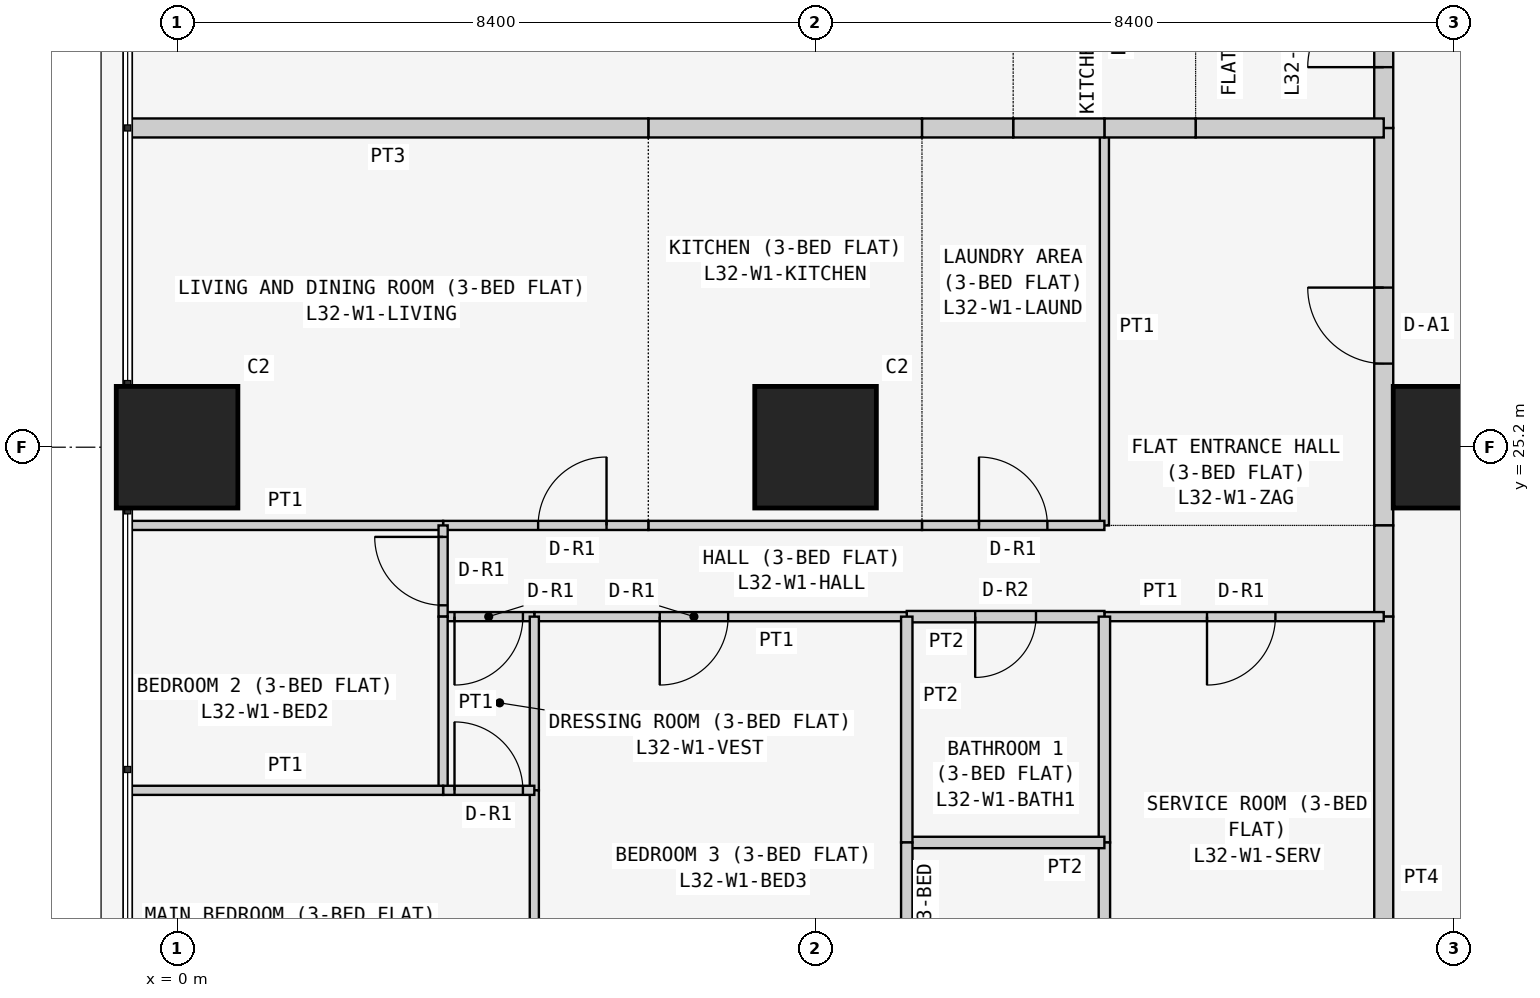
"""IFC4 building model, lengths in metres.
Left out: names, types, materials, properties, quantities, classifications, styles, units other than length and angle.
Written with IfcOpenShell. Run it as: python <this file> out.ifc"""

import sys

from ifc_helpers import new_model, si_unit, direction, frame, frame_2d, origin, origin_2d, place, context, subcontext, project, spatial, rectangle, extrude, element, fill, save


model = new_model("IFC4")
c1 = context("Model", 3, precision=1e-05, world=origin(), true_north=direction((0.0, 1.0)))
c2 = subcontext(c1, "Body", "Model", "MODEL_VIEW")
j1 = project(units=[si_unit("LENGTHUNIT", "METRE"), si_unit("PLANEANGLEUNIT", "RADIAN")], contexts=[c1])
p1 = place(None, origin())
s1 = spatial("IfcSite", under=j1, at=p1, CompositionType="ELEMENT")
p2 = place(p1, origin())
s2 = spatial("IfcBuilding", under=s1, at=p2, CompositionType="ELEMENT")
p3 = place(p2, frame((0.0, 0.0, 126.9)))
s3 = spatial("IfcBuildingStorey", under=s2, at=p3, CompositionType="ELEMENT", Elevation=126.9)
for number, where, z_axis, x_axis in (
    (1, (0.0, 25.2, 0.0), (0.0, 0.0, 1.0), (1.0, 0.0, 0.0)),
    (2, (8.4, 25.2, 0.0), (0.0, 0.0, 1.0), (1.0, 0.0, 0.0)),
    (3, (16.8, 25.2, 0.0), (0.0, 0.0, 1.0), (1.0, 0.0, 0.0)),
):
    element("IfcColumn", number, at=place(p3, frame(where, z_axis=z_axis, x_axis=x_axis)), inside=s3, PredefinedType="COLUMN", context=c2, shape_type="SweptSolid", body=[
        extrude(rectangle(XDim=1.6, YDim=1.6, at=origin_2d()), origin(), (0.0, 0.0, 1.0), 3.6),
    ])
p4 = place(p3, frame((15.875, 24.171, 0.0), z_axis=(0.0, 0.0, 1.0), x_axis=(0.0, 1.0, 0.0)))
e4 = element("IfcWall", 4, at=p4, inside=s3, PredefinedType="PARTITIONING", context=c2, shape_type="SweptSolid", body=[
    extrude(rectangle(XDim=5.229, YDim=0.25, at=frame_2d((2.615, 0.0))), origin(), (0.0, 0.0, 1.0), 3.45),
])
p5 = place(p4, frame((2.129, 0.0, 0.0)))
e5 = element("IfcOpeningElement", 5, at=p5, cuts=e4, PredefinedType="OPENING", context=c2, shape_type="SweptSolid", body=[
    extrude(rectangle(XDim=1.0, YDim=2.1, at=frame_2d((0.5, 1.05))), frame((0.0, 0.135, 0.0), z_axis=(0.0, -1.0, 0.0), x_axis=(1.0, 0.0, 0.0)), (0.0, 0.0, 1.0), 0.27),
])
p6 = place(p3, frame((15.875, 22.971, 0.0), z_axis=(0.0, 0.0, 1.0), x_axis=(0.0, 1.0, 0.0)))
e6 = element("IfcWall", 6, at=p6, inside=s3, PredefinedType="PARTITIONING", context=c2, shape_type="SweptSolid", body=[
    extrude(rectangle(XDim=1.2, YDim=0.25, at=frame_2d((0.6, 0.0))), origin(), (0.0, 0.0, 1.0), 3.45),
])
p7 = place(p3, frame((15.875, 16.1, 0.0), z_axis=(0.0, 0.0, 1.0), x_axis=(0.0, 1.0, 0.0)))
e7 = element("IfcWall", 7, at=p7, inside=s3, PredefinedType="PARTITIONING", context=c2, shape_type="SweptSolid", body=[
    extrude(rectangle(XDim=6.871, YDim=0.25, at=frame_2d((3.436, 0.0))), origin(), (0.0, 0.0, 1.0), 3.45),
])
p8 = place(p3, frame((15.875, 29.4, 0.0), z_axis=(0.0, 0.0, 1.0), x_axis=(0.0, 1.0, 0.0)))
e8 = element("IfcWall", 8, at=p8, inside=s3, PredefinedType="PARTITIONING", context=c2, shape_type="SweptSolid", body=[
    extrude(rectangle(XDim=2.6, YDim=0.25, at=frame_2d((1.3, 0.0))), origin(), (0.0, 0.0, 1.0), 3.45),
])
p9 = place(p8, frame((0.8, 0.0, 0.0)))
e9 = element("IfcOpeningElement", 9, at=p9, cuts=e8, PredefinedType="OPENING", context=c2, shape_type="SweptSolid", body=[
    extrude(rectangle(XDim=1.0, YDim=2.1, at=frame_2d((0.5, 1.05))), frame((0.0, 0.135, 0.0), z_axis=(0.0, -1.0, 0.0), x_axis=(1.0, 0.0, 0.0)), (0.0, 0.0, 1.0), 0.27),
])
p10 = place(p3, frame((12.2, 29.4, 0.0), z_axis=(0.0, 0.0, 1.0), x_axis=(0.0, -1.0, 0.0)))
e10 = element("IfcWall", 10, at=p10, inside=s3, PredefinedType="PARTITIONING", context=c2, shape_type="SweptSolid", body=[
    extrude(rectangle(XDim=5.229, YDim=0.12, at=frame_2d((2.615, 0.0))), origin(), (0.0, 0.0, 1.0), 3.45),
])
p11 = place(p3, frame((15.875, 29.4, 0.0), z_axis=(0.0, 0.0, 1.0), x_axis=(-1.0, 0.0, 0.0)))
e11 = element("IfcWall", 11, at=p11, inside=s3, PredefinedType="PARTITIONING", context=c2, shape_type="SweptSolid", body=[
    extrude(rectangle(XDim=2.475, YDim=0.25, at=frame_2d((1.238, 0.0))), origin(), (0.0, 0.0, 1.0), 3.45),
])
p12 = place(p3, frame((13.4, 29.4, 0.0), z_axis=(0.0, 0.0, 1.0), x_axis=(-1.0, 0.0, 0.0)))
e12 = element("IfcWall", 12, at=p12, inside=s3, PredefinedType="PARTITIONING", context=c2, shape_type="SweptSolid", body=[
    extrude(rectangle(XDim=1.2, YDim=0.25, at=frame_2d((0.6, 0.0))), origin(), (0.0, 0.0, 1.0), 3.45),
])
p13 = place(p3, frame((9.8, 24.171, 0.0), z_axis=(0.0, 0.0, 1.0), x_axis=(1.0, 0.0, 0.0)))
e13 = element("IfcWall", 13, at=p13, inside=s3, PredefinedType="PARTITIONING", context=c2, shape_type="SweptSolid", body=[
    extrude(rectangle(XDim=2.4, YDim=0.12, at=frame_2d((1.2, 0.0))), origin(), (0.0, 0.0, 1.0), 3.45),
])
p14 = place(p13, frame((0.75, 0.0, 0.0)))
e14 = element("IfcOpeningElement", 14, at=p14, cuts=e13, PredefinedType="OPENING", context=c2, shape_type="SweptSolid", body=[
    extrude(rectangle(XDim=0.9, YDim=2.1, at=frame_2d((0.45, 1.05))), frame((0.0, 0.07, 0.0), z_axis=(0.0, -1.0, 0.0), x_axis=(1.0, 0.0, 0.0)), (0.0, 0.0, 1.0), 0.14),
])
for number, where, z_axis, x_axis in (
    (15, (12.2, 29.4, 0.0), (0.0, 0.0, 1.0), (-1.0, 0.0, 0.0)),
    (16, (11.0, 29.4, 0.0), (0.0, 0.0, 1.0), (-1.0, 0.0, 0.0)),
):
    element("IfcWall", number, at=place(p3, frame(where, z_axis=z_axis, x_axis=x_axis)), inside=s3, PredefinedType="PARTITIONING", context=c2, shape_type="SweptSolid", body=[
        extrude(rectangle(XDim=1.2, YDim=0.25, at=frame_2d((0.6, 0.0))), origin(), (0.0, 0.0, 1.0), 3.45),
    ])
p15 = place(p3, frame((6.2, 24.171, 0.0), z_axis=(0.0, 0.0, 1.0), x_axis=(1.0, 0.0, 0.0)))
e17 = element("IfcWall", 17, at=p15, inside=s3, PredefinedType="PARTITIONING", context=c2, shape_type="SweptSolid", body=[
    extrude(rectangle(XDim=3.6, YDim=0.12, at=frame_2d((1.8, 0.0))), origin(), (0.0, 0.0, 1.0), 3.45),
])
p16 = place(p3, frame((9.8, 29.4, 0.0), z_axis=(0.0, 0.0, 1.0), x_axis=(-1.0, 0.0, 0.0)))
e18 = element("IfcWall", 18, at=p16, inside=s3, PredefinedType="PARTITIONING", context=c2, shape_type="SweptSolid", body=[
    extrude(rectangle(XDim=3.6, YDim=0.25, at=frame_2d((1.8, 0.0))), origin(), (0.0, 0.0, 1.0), 3.45),
])
p17 = place(p3, frame((3.5, 24.171, 0.0), z_axis=(0.0, 0.0, 1.0), x_axis=(1.0, 0.0, 0.0)))
e19 = element("IfcWall", 19, at=p17, inside=s3, PredefinedType="PARTITIONING", context=c2, shape_type="SweptSolid", body=[
    extrude(rectangle(XDim=2.7, YDim=0.12, at=frame_2d((1.35, 0.0))), origin(), (0.0, 0.0, 1.0), 3.45),
])
p18 = place(p17, frame((1.25, 0.0, 0.0)))
e20 = element("IfcOpeningElement", 20, at=p18, cuts=e19, PredefinedType="OPENING", context=c2, shape_type="SweptSolid", body=[
    extrude(rectangle(XDim=0.9, YDim=2.1, at=frame_2d((0.45, 1.05))), frame((0.0, 0.07, 0.0), z_axis=(0.0, -1.0, 0.0), x_axis=(1.0, 0.0, 0.0)), (0.0, 0.0, 1.0), 0.14),
])
p19 = place(p3, frame((-0.65, 24.171, 0.0), z_axis=(0.0, 0.0, 1.0), x_axis=(1.0, 0.0, 0.0)))
e21 = element("IfcWall", 21, at=p19, inside=s3, PredefinedType="PARTITIONING", context=c2, shape_type="SweptSolid", body=[
    extrude(rectangle(XDim=4.15, YDim=0.12, at=frame_2d((2.075, 0.0))), origin(), (0.0, 0.0, 1.0), 3.45),
])
p20 = place(p3, frame((6.2, 29.4, 0.0), z_axis=(0.0, 0.0, 1.0), x_axis=(-1.0, 0.0, 0.0)))
e22 = element("IfcWall", 22, at=p20, inside=s3, PredefinedType="PARTITIONING", context=c2, shape_type="SweptSolid", body=[
    extrude(rectangle(XDim=6.85, YDim=0.25, at=frame_2d((3.425, 0.0))), origin(), (0.0, 0.0, 1.0), 3.45),
])
p21 = place(p3, frame((12.2, 22.971, 0.0), z_axis=(0.0, 0.0, 1.0), x_axis=(1.0, 0.0, 0.0)))
e23 = element("IfcWall", 23, at=p21, inside=s3, PredefinedType="PARTITIONING", context=c2, shape_type="SweptSolid", body=[
    extrude(rectangle(XDim=3.675, YDim=0.12, at=frame_2d((1.837, 0.0))), origin(), (0.0, 0.0, 1.0), 3.45),
])
p22 = place(p21, frame((1.35, 0.0, 0.0)))
e24 = element("IfcOpeningElement", 24, at=p22, cuts=e23, PredefinedType="OPENING", context=c2, shape_type="SweptSolid", body=[
    extrude(rectangle(XDim=0.9, YDim=2.1, at=frame_2d((0.45, 1.05))), frame((0.0, 0.07, 0.0), z_axis=(0.0, -1.0, 0.0), x_axis=(1.0, 0.0, 0.0)), (0.0, 0.0, 1.0), 0.14),
])
p23 = place(p3, frame((9.6, 22.971, 0.0), z_axis=(0.0, 0.0, 1.0), x_axis=(1.0, 0.0, 0.0)))
e25 = element("IfcWall", 25, at=p23, inside=s3, PredefinedType="PARTITIONING", context=c2, shape_type="SweptSolid", body=[
    extrude(rectangle(XDim=2.6, YDim=0.15, at=frame_2d((1.3, 0.0))), origin(), (0.0, 0.0, 1.0), 3.45),
])
p24 = place(p23, frame((0.9, 0.0, 0.0)))
e26 = element("IfcOpeningElement", 26, at=p24, cuts=e25, PredefinedType="OPENING", context=c2, shape_type="SweptSolid", body=[
    extrude(rectangle(XDim=0.8, YDim=2.1, at=frame_2d((0.4, 1.05))), frame((0.0, 0.085, 0.0), z_axis=(0.0, -1.0, 0.0), x_axis=(1.0, 0.0, 0.0)), (0.0, 0.0, 1.0), 0.17),
])
p25 = place(p3, frame((4.7, 22.971, 0.0), z_axis=(0.0, 0.0, 1.0), x_axis=(1.0, 0.0, 0.0)))
e27 = element("IfcWall", 27, at=p25, inside=s3, PredefinedType="PARTITIONING", context=c2, shape_type="SweptSolid", body=[
    extrude(rectangle(XDim=4.9, YDim=0.12, at=frame_2d((2.45, 0.0))), origin(), (0.0, 0.0, 1.0), 3.45),
])
p26 = place(p25, frame((1.65, 0.0, 0.0)))
e28 = element("IfcOpeningElement", 28, at=p26, cuts=e27, PredefinedType="OPENING", context=c2, shape_type="SweptSolid", body=[
    extrude(rectangle(XDim=0.9, YDim=2.1, at=frame_2d((0.45, 1.05))), frame((0.0, 0.07, 0.0), z_axis=(0.0, -1.0, 0.0), x_axis=(1.0, 0.0, 0.0)), (0.0, 0.0, 1.0), 0.14),
])
p27 = place(p3, frame((3.5, 22.971, 0.0), z_axis=(0.0, 0.0, 1.0), x_axis=(1.0, 0.0, 0.0)))
e29 = element("IfcWall", 29, at=p27, inside=s3, PredefinedType="PARTITIONING", context=c2, shape_type="SweptSolid", body=[
    extrude(rectangle(XDim=1.2, YDim=0.12, at=frame_2d((0.6, 0.0))), origin(), (0.0, 0.0, 1.0), 3.45),
])
p28 = place(p27, frame((0.15, 0.0, 0.0)))
e30 = element("IfcOpeningElement", 30, at=p28, cuts=e29, PredefinedType="OPENING", context=c2, shape_type="SweptSolid", body=[
    extrude(rectangle(XDim=0.9, YDim=2.1, at=frame_2d((0.45, 1.05))), frame((0.0, 0.07, 0.0), z_axis=(0.0, -1.0, 0.0), x_axis=(1.0, 0.0, 0.0)), (0.0, 0.0, 1.0), 0.14),
])
p29 = place(p3, frame((3.5, 24.171, 0.0), z_axis=(0.0, 0.0, 1.0), x_axis=(0.0, -1.0, 0.0)))
e31 = element("IfcWall", 31, at=p29, inside=s3, PredefinedType="PARTITIONING", context=c2, shape_type="SweptSolid", body=[
    extrude(rectangle(XDim=1.2, YDim=0.12, at=frame_2d((0.6, 0.0))), origin(), (0.0, 0.0, 1.0), 3.45),
])
p30 = place(p29, frame((0.151, 0.0, 0.0)))
e32 = element("IfcOpeningElement", 32, at=p30, cuts=e31, PredefinedType="OPENING", context=c2, shape_type="SweptSolid", body=[
    extrude(rectangle(XDim=0.9, YDim=2.1, at=frame_2d((0.45, 1.05))), frame((0.0, 0.07, 0.0), z_axis=(0.0, -1.0, 0.0), x_axis=(1.0, 0.0, 0.0)), (0.0, 0.0, 1.0), 0.14),
])
p31 = place(p3, frame((12.2, 22.971, 0.0), z_axis=(0.0, 0.0, 1.0), x_axis=(0.0, -1.0, 0.0)))
e33 = element("IfcWall", 33, at=p31, inside=s3, PredefinedType="PARTITIONING", context=c2, shape_type="SweptSolid", body=[
    extrude(rectangle(XDim=2.971, YDim=0.15, at=frame_2d((1.485, 0.0))), origin(), (0.0, 0.0, 1.0), 3.45),
])
p32 = place(p3, frame((12.2, 20.0, 0.0), z_axis=(0.0, 0.0, 1.0), x_axis=(0.0, -1.0, 0.0)))
e34 = element("IfcWall", 34, at=p32, inside=s3, PredefinedType="PARTITIONING", context=c2, shape_type="SweptSolid", body=[
    extrude(rectangle(XDim=3.9, YDim=0.15, at=frame_2d((1.95, 0.0))), origin(), (0.0, 0.0, 1.0), 3.45),
])
p33 = place(p32, frame((1.45, 0.0, 0.0)))
e35 = element("IfcOpeningElement", 35, at=p33, cuts=e34, PredefinedType="OPENING", context=c2, shape_type="SweptSolid", body=[
    extrude(rectangle(XDim=0.8, YDim=2.1, at=frame_2d((0.4, 1.05))), frame((0.0, 0.085, 0.0), z_axis=(0.0, -1.0, 0.0), x_axis=(1.0, 0.0, 0.0)), (0.0, 0.0, 1.0), 0.17),
])
p34 = place(p3, frame((9.6, 20.0, 0.0), z_axis=(0.0, 0.0, 1.0), x_axis=(1.0, 0.0, 0.0)))
e36 = element("IfcWall", 36, at=p34, inside=s3, PredefinedType="PARTITIONING", context=c2, shape_type="SweptSolid", body=[
    extrude(rectangle(XDim=2.6, YDim=0.15, at=frame_2d((1.3, 0.0))), origin(), (0.0, 0.0, 1.0), 3.45),
])
p35 = place(p3, frame((9.6, 22.971, 0.0), z_axis=(0.0, 0.0, 1.0), x_axis=(0.0, -1.0, 0.0)))
e37 = element("IfcWall", 37, at=p35, inside=s3, PredefinedType="PARTITIONING", context=c2, shape_type="SweptSolid", body=[
    extrude(rectangle(XDim=2.971, YDim=0.15, at=frame_2d((1.485, 0.0))), origin(), (0.0, 0.0, 1.0), 3.45),
])
p36 = place(p3, frame((9.6, 20.0, 0.0), z_axis=(0.0, 0.0, 1.0), x_axis=(0.0, -1.0, 0.0)))
e38 = element("IfcWall", 38, at=p36, inside=s3, PredefinedType="PARTITIONING", context=c2, shape_type="SweptSolid", body=[
    extrude(rectangle(XDim=3.9, YDim=0.15, at=frame_2d((1.95, 0.0))), origin(), (0.0, 0.0, 1.0), 3.45),
])
p37 = place(p3, frame((4.7, 22.971, 0.0), z_axis=(0.0, 0.0, 1.0), x_axis=(0.0, -1.0, 0.0)))
e39 = element("IfcWall", 39, at=p37, inside=s3, PredefinedType="PARTITIONING", context=c2, shape_type="SweptSolid", body=[
    extrude(rectangle(XDim=2.285, YDim=0.12, at=frame_2d((1.143, 0.0))), origin(), (0.0, 0.0, 1.0), 3.45),
])
p38 = place(p3, frame((4.7, 20.686, 0.0), z_axis=(0.0, 0.0, 1.0), x_axis=(0.0, -1.0, 0.0)))
e40 = element("IfcWall", 40, at=p38, inside=s3, PredefinedType="PARTITIONING", context=c2, shape_type="SweptSolid", body=[
    extrude(rectangle(XDim=4.586, YDim=0.12, at=frame_2d((2.293, 0.0))), origin(), (0.0, 0.0, 1.0), 3.45),
])
p39 = place(p3, frame((3.5, 22.971, 0.0), z_axis=(0.0, 0.0, 1.0), x_axis=(0.0, -1.0, 0.0)))
e41 = element("IfcWall", 41, at=p39, inside=s3, PredefinedType="PARTITIONING", context=c2, shape_type="SweptSolid", body=[
    extrude(rectangle(XDim=2.285, YDim=0.12, at=frame_2d((1.143, 0.0))), origin(), (0.0, 0.0, 1.0), 3.45),
])
p40 = place(p3, frame((3.5, 20.686, 0.0), z_axis=(0.0, 0.0, 1.0), x_axis=(1.0, 0.0, 0.0)))
e42 = element("IfcWall", 42, at=p40, inside=s3, PredefinedType="PARTITIONING", context=c2, shape_type="SweptSolid", body=[
    extrude(rectangle(XDim=1.2, YDim=0.12, at=frame_2d((0.6, 0.0))), origin(), (0.0, 0.0, 1.0), 3.45),
])
p41 = place(p40, frame((0.15, 0.0, 0.0)))
e43 = element("IfcOpeningElement", 43, at=p41, cuts=e42, PredefinedType="OPENING", context=c2, shape_type="SweptSolid", body=[
    extrude(rectangle(XDim=0.9, YDim=2.1, at=frame_2d((0.45, 1.05))), frame((0.0, 0.07, 0.0), z_axis=(0.0, -1.0, 0.0), x_axis=(1.0, 0.0, 0.0)), (0.0, 0.0, 1.0), 0.14),
])
p42 = place(p3, frame((-0.65, 20.686, 0.0), z_axis=(0.0, 0.0, 1.0), x_axis=(1.0, 0.0, 0.0)))
e44 = element("IfcWall", 44, at=p42, inside=s3, PredefinedType="PARTITIONING", context=c2, shape_type="SweptSolid", body=[
    extrude(rectangle(XDim=4.15, YDim=0.12, at=frame_2d((2.075, 0.0))), origin(), (0.0, 0.0, 1.0), 3.45),
])
p43 = place(p5, origin())
e45 = element("IfcDoor", 45, at=p43, inside=s3, OperationType="SINGLE_SWING_RIGHT", PredefinedType="DOOR", context=c2, shape_type="SweptSolid", body=[
    extrude(rectangle(XDim=1.0, YDim=2.1, at=frame_2d((0.5, 1.05))), frame((0.0, 0.025, 0.0), z_axis=(0.0, -1.0, 0.0), x_axis=(1.0, 0.0, 0.0)), (0.0, 0.0, 1.0), 0.05),
])
fill(e5, e45)
p44 = place(p14, origin())
e46 = element("IfcDoor", 46, at=p44, inside=s3, OperationType="SINGLE_SWING_LEFT", PredefinedType="DOOR", context=c2, shape_type="SweptSolid", body=[
    extrude(rectangle(XDim=0.9, YDim=2.1, at=frame_2d((0.45, 1.05))), frame((0.0, 0.025, 0.0), z_axis=(0.0, -1.0, 0.0), x_axis=(1.0, 0.0, 0.0)), (0.0, 0.0, 1.0), 0.05),
])
fill(e14, e46)
p45 = place(p18, origin())
e47 = element("IfcDoor", 47, at=p45, inside=s3, OperationType="SINGLE_SWING_RIGHT", PredefinedType="DOOR", context=c2, shape_type="SweptSolid", body=[
    extrude(rectangle(XDim=0.9, YDim=2.1, at=frame_2d((0.45, 1.05))), frame((0.0, 0.025, 0.0), z_axis=(0.0, -1.0, 0.0), x_axis=(1.0, 0.0, 0.0)), (0.0, 0.0, 1.0), 0.05),
])
fill(e20, e47)
p46 = place(p22, frame((0.9, 0.0, 0.0), z_axis=(0.0, 0.0, 1.0), x_axis=(-1.0, 0.0, 0.0)))
e48 = element("IfcDoor", 48, at=p46, inside=s3, OperationType="SINGLE_SWING_RIGHT", PredefinedType="DOOR", context=c2, shape_type="SweptSolid", body=[
    extrude(rectangle(XDim=0.9, YDim=2.1, at=frame_2d((0.45, 1.05))), frame((0.0, 0.025, 0.0), z_axis=(0.0, -1.0, 0.0), x_axis=(1.0, 0.0, 0.0)), (0.0, 0.0, 1.0), 0.05),
])
fill(e24, e48)
p47 = place(p24, frame((0.8, 0.0, 0.0), z_axis=(0.0, 0.0, 1.0), x_axis=(-1.0, 0.0, 0.0)))
e49 = element("IfcDoor", 49, at=p47, inside=s3, OperationType="SINGLE_SWING_RIGHT", PredefinedType="DOOR", context=c2, shape_type="SweptSolid", body=[
    extrude(rectangle(XDim=0.8, YDim=2.1, at=frame_2d((0.4, 1.05))), frame((0.0, 0.025, 0.0), z_axis=(0.0, -1.0, 0.0), x_axis=(1.0, 0.0, 0.0)), (0.0, 0.0, 1.0), 0.05),
])
fill(e26, e49)
p48 = place(p26, frame((0.9, 0.0, 0.0), z_axis=(0.0, 0.0, 1.0), x_axis=(-1.0, 0.0, 0.0)))
e50 = element("IfcDoor", 50, at=p48, inside=s3, OperationType="SINGLE_SWING_RIGHT", PredefinedType="DOOR", context=c2, shape_type="SweptSolid", body=[
    extrude(rectangle(XDim=0.9, YDim=2.1, at=frame_2d((0.45, 1.05))), frame((0.0, 0.025, 0.0), z_axis=(0.0, -1.0, 0.0), x_axis=(1.0, 0.0, 0.0)), (0.0, 0.0, 1.0), 0.05),
])
fill(e28, e50)
p49 = place(p28, frame((0.9, 0.0, 0.0), z_axis=(0.0, 0.0, 1.0), x_axis=(-1.0, 0.0, 0.0)))
e51 = element("IfcDoor", 51, at=p49, inside=s3, OperationType="SINGLE_SWING_RIGHT", PredefinedType="DOOR", context=c2, shape_type="SweptSolid", body=[
    extrude(rectangle(XDim=0.9, YDim=2.1, at=frame_2d((0.45, 1.05))), frame((0.0, 0.025, 0.0), z_axis=(0.0, -1.0, 0.0), x_axis=(1.0, 0.0, 0.0)), (0.0, 0.0, 1.0), 0.05),
])
fill(e30, e51)
p50 = place(p41, origin())
e52 = element("IfcDoor", 52, at=p50, inside=s3, OperationType="SINGLE_SWING_LEFT", PredefinedType="DOOR", context=c2, shape_type="SweptSolid", body=[
    extrude(rectangle(XDim=0.9, YDim=2.1, at=frame_2d((0.45, 1.05))), frame((0.0, 0.025, 0.0), z_axis=(0.0, -1.0, 0.0), x_axis=(1.0, 0.0, 0.0)), (0.0, 0.0, 1.0), 0.05),
])
fill(e43, e52)
p51 = place(p30, frame((0.9, 0.0, 0.0), z_axis=(0.0, 0.0, 1.0), x_axis=(-1.0, 0.0, 0.0)))
e53 = element("IfcDoor", 53, at=p51, inside=s3, OperationType="SINGLE_SWING_RIGHT", PredefinedType="DOOR", context=c2, shape_type="SweptSolid", body=[
    extrude(rectangle(XDim=0.9, YDim=2.1, at=frame_2d((0.45, 1.05))), frame((0.0, 0.025, 0.0), z_axis=(0.0, -1.0, 0.0), x_axis=(1.0, 0.0, 0.0)), (0.0, 0.0, 1.0), 0.05),
])
fill(e32, e53)
p52 = place(p9, origin())
e54 = element("IfcDoor", 54, at=p52, inside=s3, OperationType="SINGLE_SWING_LEFT", PredefinedType="DOOR", context=c2, shape_type="SweptSolid", body=[
    extrude(rectangle(XDim=1.0, YDim=2.1, at=frame_2d((0.5, 1.05))), frame((0.0, 0.025, 0.0), z_axis=(0.0, -1.0, 0.0), x_axis=(1.0, 0.0, 0.0)), (0.0, 0.0, 1.0), 0.05),
])
fill(e9, e54)
save(model, sys.argv[1])
